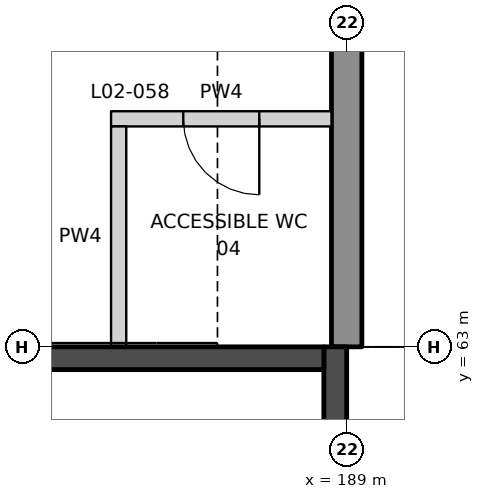
"""IFC4 building model, lengths in metres.
Left out: names, types, materials, properties, quantities, classifications, styles, units other than length and angle.
Written with IfcOpenShell. Run it as: python <this file> out.ifc"""

import sys

from ifc_helpers import new_model, si_unit, direction, frame, frame_2d, origin, place, context, subcontext, project, spatial, polyline, rectangle, outline, extrude, element, fill, save


model = new_model("IFC4")
c1 = context("Model", 3, precision=1e-05, world=origin(), true_north=direction((0.0, 1.0)))
c2 = subcontext(c1, "Body", "Model", "MODEL_VIEW")
j1 = project(units=[si_unit("LENGTHUNIT", "METRE"), si_unit("PLANEANGLEUNIT", "RADIAN")], contexts=[c1])
p1 = place(None, origin())
s1 = spatial("IfcSite", under=j1, at=p1, CompositionType="ELEMENT")
p2 = place(p1, origin())
s2 = spatial("IfcBuilding", under=s1, at=p2, CompositionType="ELEMENT")
p3 = place(p2, frame((0.0, 0.0, 11.5)))
s3 = spatial("IfcBuildingStorey", under=s2, at=p3, CompositionType="ELEMENT", Elevation=11.5)
p4 = place(p3, frame((189.0, 63.0, 0.0), z_axis=(0.0, 0.0, 1.0), x_axis=(0.0, 1.0, 0.0)))
e1 = element("IfcWall", 1, at=p4, inside=s3, PredefinedType="SOLIDWALL", context=c2, shape_type="SweptSolid", body=[
    extrude(rectangle(XDim=36.0, YDim=0.4, at=frame_2d((18.0, 0.0))), origin(), (0.0, 0.0, 1.0), 10.5),
])
p5 = place(p3, frame((185.9, 66.0, 0.0), z_axis=(0.0, 0.0, 1.0), x_axis=(1.0, 0.0, 0.0)))
e2 = element("IfcWall", 2, at=p5, inside=s3, PredefinedType="PARTITIONING", context=c2, shape_type="SweptSolid", body=[
    extrude(outline(polyline([(0.0, 0.0), (2.9, 0.0), (2.9, 10.5), (1.45, 10.5), (0.967, 10.049), (0.0, 9.445), (0.0, 0.0)])), frame((0.0, 0.1, 0.0), z_axis=(0.0, -1.0, 0.0), x_axis=(1.0, 0.0, 0.0)), (0.0, 0.0, 1.0), 0.2),
])
p6 = place(p5, frame((0.95, 0.0, 0.0)))
e3 = element("IfcOpeningElement", 3, at=p6, cuts=e2, PredefinedType="OPENING", context=c2, shape_type="SweptSolid", body=[
    extrude(rectangle(XDim=1.0, YDim=2.1, at=frame_2d((0.5, 1.05))), frame((0.0, 0.11, 0.0), z_axis=(0.0, -1.0, 0.0), x_axis=(1.0, 0.0, 0.0)), (0.0, 0.0, 1.0), 0.22),
])
p7 = place(p3, frame((186.0, 63.0, 0.0), z_axis=(0.0, 0.0, 1.0), x_axis=(0.0, 1.0, 0.0)))
e4 = element("IfcWall", 4, at=p7, inside=s3, PredefinedType="PARTITIONING", context=c2, shape_type="SweptSolid", body=[
    extrude(outline(polyline([(0.0, 0.0), (2.9, 0.0), (2.9, 9.508), (0.483, 9.508), (0.0, 10.5), (0.0, 0.0)])), frame((0.0, 0.1, 0.0), z_axis=(0.0, -1.0, 0.0), x_axis=(1.0, 0.0, 0.0)), (0.0, 0.0, 1.0), 0.2),
])
p8 = place(p3, frame((188.85, 63.0, 0.0), z_axis=(0.0, 0.0, 1.0), x_axis=(0.0, -1.0, 0.0)))
e5 = element("IfcWall", 5, at=p8, inside=s3, PredefinedType="SHEAR", context=c2, shape_type="SweptSolid", body=[
    extrude(rectangle(XDim=18.0, YDim=0.3, at=frame_2d((9.0, 0.0))), origin(), (0.0, 0.0, 1.0), 10.5),
])
p9 = place(p3, frame((180.3, 62.85, 0.0), z_axis=(0.0, 0.0, 1.0), x_axis=(1.0, 0.0, 0.0)))
e6 = element("IfcWall", 6, at=p9, inside=s3, PredefinedType="SHEAR", context=c2, shape_type="SweptSolid", body=[
    extrude(rectangle(XDim=8.4, YDim=0.3, at=frame_2d((4.2, 0.0))), origin(), (0.0, 0.0, 1.0), 10.5),
])
p10 = place(p6, frame((1.0, 0.0, 0.0), z_axis=(0.0, 0.0, 1.0), x_axis=(-1.0, 0.0, 0.0)))
e7 = element("IfcDoor", 7, at=p10, inside=s3, OperationType="SINGLE_SWING_LEFT", PredefinedType="DOOR", context=c2, shape_type="SweptSolid", body=[
    extrude(rectangle(XDim=1.0, YDim=2.1, at=frame_2d((0.5, 1.05))), frame((0.0, 0.025, 0.0), z_axis=(0.0, -1.0, 0.0), x_axis=(1.0, 0.0, 0.0)), (0.0, 0.0, 1.0), 0.05),
])
fill(e3, e7)
save(model, sys.argv[1])
